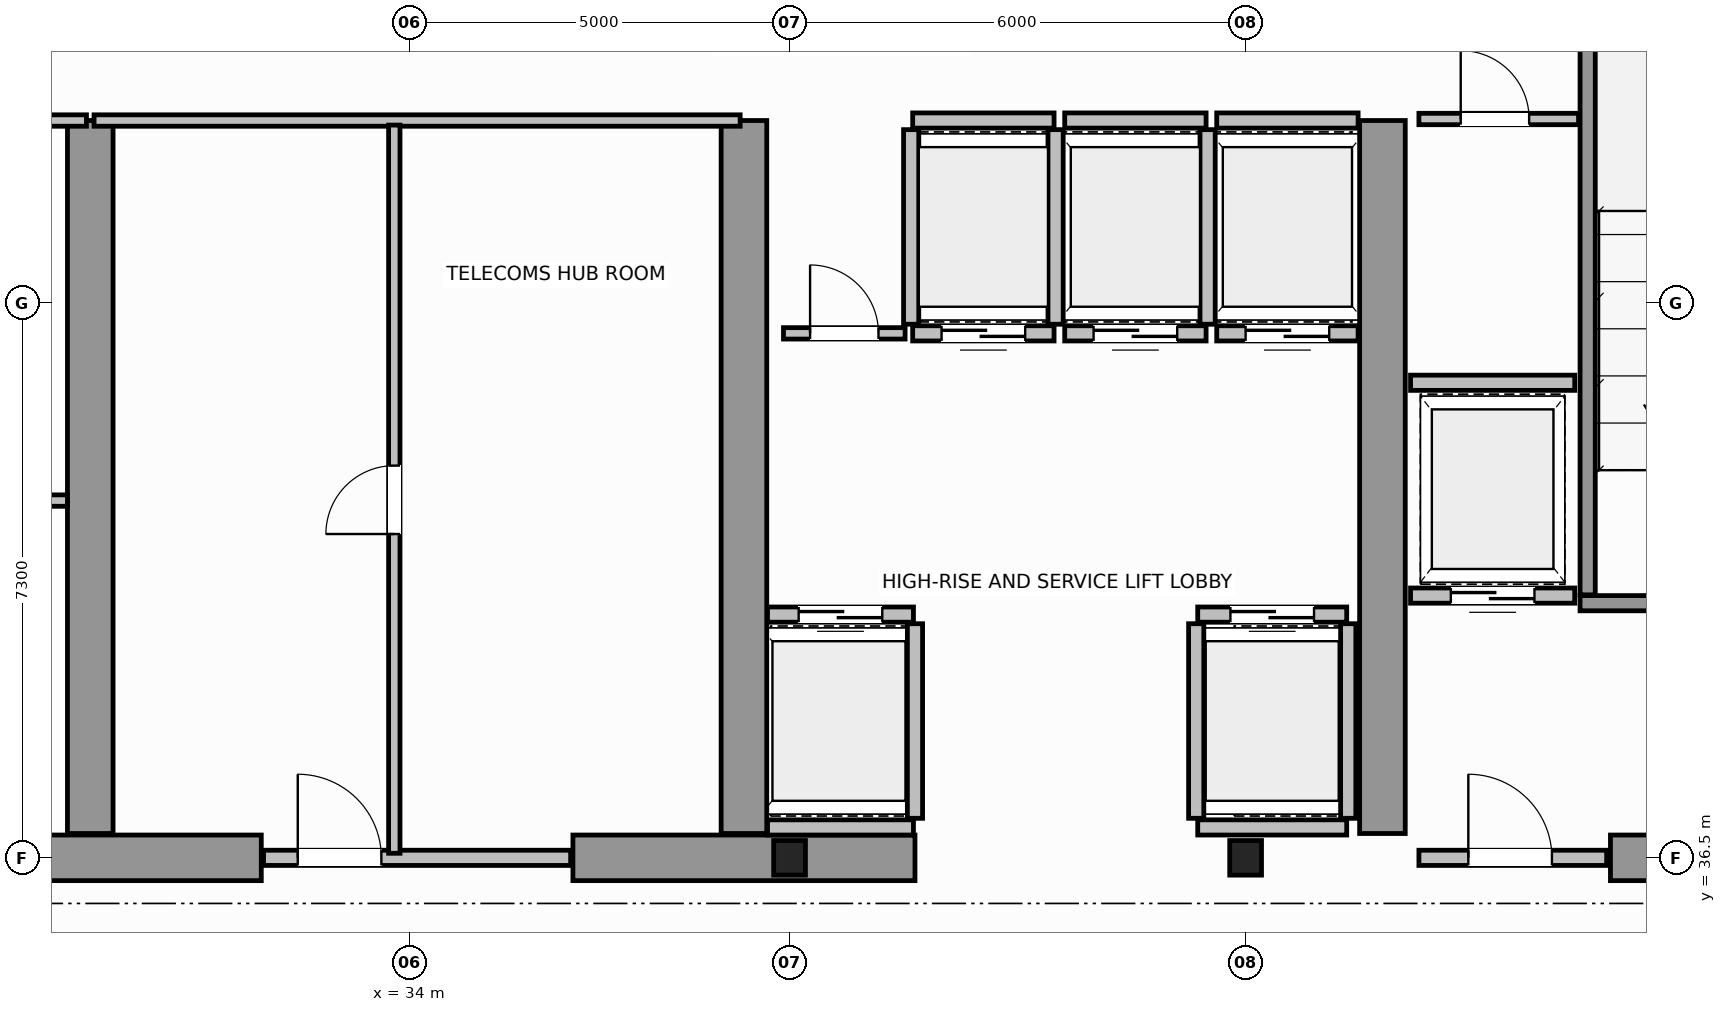
"""IFC4 building model, lengths in metres.
Left out: names, types, materials, properties, quantities, classifications, styles, units other than length and angle.
Written with IfcOpenShell. Run it as: python <this file> out.ifc"""

import sys

from ifc_helpers import new_model, si_unit, direction, frame, frame_2d, origin, origin_2d, place, context, subcontext, project, spatial, rectangle, i_section, extrude, source, transform, mapped, element, fill, save


model = new_model("IFC4")
c1 = context("Model", 3, precision=1e-05, world=origin(), true_north=direction((0.0, 1.0)))
c2 = subcontext(c1, "Body", "Model", "MODEL_VIEW")
j1 = project(units=[si_unit("LENGTHUNIT", "METRE"), si_unit("PLANEANGLEUNIT", "RADIAN")], contexts=[c1])
p1 = place(None, origin())
s1 = spatial("IfcSite", under=j1, at=p1, CompositionType="ELEMENT")
p2 = place(p1, origin())
s2 = spatial("IfcBuilding", under=s1, at=p2, CompositionType="ELEMENT")
p3 = place(p2, frame((0.0, 0.0, 242.2)))
s3 = spatial("IfcBuildingStorey", under=s2, at=p3, CompositionType="ELEMENT", Elevation=242.2)
m1 = source(origin(), c2, "Body", "SweptSolid", [
    extrude(i_section(OverallWidth=0.418, OverallDepth=0.455, WebThickness=0.042, FlangeThickness=0.058, FilletRadius=0.015, at=origin_2d()), origin(), (0.0, 0.0, 1.0), 3.8),
])
for number, where, z_axis, x_axis in (
    (1, (39.0, 36.5, 0.0), (0.0, 0.0, 1.0), (1.0, 0.0, 0.0)),
    (2, (45.0, 36.5, 0.0), (0.0, 0.0, 1.0), (1.0, 0.0, 0.0)),
):
    element("IfcColumn", number, at=place(p3, frame(where, z_axis=z_axis, x_axis=x_axis)), inside=s3, PredefinedType="COLUMN", context=c2, shape_type="MappedRepresentation", body=[
        mapped(m1, transform((0.0, 0.0, 0.0), scale=1.0)),
    ])
for number, where, z_axis, x_axis in (
    (3, (27.55, 36.5, 0.0), (0.0, 0.0, 1.0), (1.0, 0.0, 0.0)),
    (4, (36.15, 36.5, 0.0), (0.0, 0.0, 1.0), (1.0, 0.0, 0.0)),
):
    element("IfcWall", number, at=place(p3, frame(where, z_axis=z_axis, x_axis=x_axis)), inside=s3, PredefinedType="SHEAR", context=c2, shape_type="SweptSolid", body=[
        extrude(rectangle(XDim=4.5, YDim=0.6, at=frame_2d((2.25, 0.0))), origin(), (0.0, 0.0, 1.0), 3.8),
    ])
p4 = place(p3, frame((49.8, 36.5, 0.0), z_axis=(0.0, 0.0, 1.0), x_axis=(1.0, 0.0, 0.0)))
e5 = element("IfcWall", 5, at=p4, inside=s3, PredefinedType="SHEAR", context=c2, shape_type="SweptSolid", body=[
    extrude(rectangle(XDim=3.88, YDim=0.6, at=frame_2d((1.94, 0.0))), origin(), (0.0, 0.0, 1.0), 2.58),
])
for number, where, z_axis, x_axis in (
    (6, (29.8, 36.82, 0.0), (0.0, 0.0, 1.0), (0.0, 1.0, 0.0)),
    (7, (38.4, 36.82, 0.0), (0.0, 0.0, 1.0), (0.0, 1.0, 0.0)),
    (8, (46.8, 36.82, 0.0), (0.0, 0.0, 1.0), (0.0, 1.0, 0.0)),
):
    element("IfcWall", number, at=place(p3, frame(where, z_axis=z_axis, x_axis=x_axis)), inside=s3, PredefinedType="SHEAR", context=c2, shape_type="SweptSolid", body=[
        extrude(rectangle(XDim=9.38, YDim=0.6, at=frame_2d((4.69, 0.0))), origin(), (0.0, 0.0, 1.0), 3.8),
    ])
p5 = place(p3, frame((49.4, 39.85, 0.0), z_axis=(0.0, 0.0, 1.0), x_axis=(1.0, 0.0, 0.0)))
e9 = element("IfcWall", 9, at=p5, inside=s3, PredefinedType="SOLIDWALL", context=c2, shape_type="SweptSolid", body=[
    extrude(rectangle(XDim=4.3, YDim=0.2, at=frame_2d((2.15, 0.0))), origin(), (0.0, 0.0, 1.0), 3.8),
])
p6 = place(p5, frame((1.325, 0.0, 0.0)))
e10 = element("IfcOpeningElement", 10, at=p6, cuts=e9, PredefinedType="OPENING", context=c2, shape_type="SweptSolid", body=[
    extrude(rectangle(XDim=1.1, YDim=2.15, at=frame_2d((0.55, 1.075))), frame((0.0, 0.11, 0.0), z_axis=(0.0, -1.0, 0.0), x_axis=(1.0, 0.0, 0.0)), (0.0, 0.0, 1.0), 0.22),
])
p7 = place(p3, frame((49.5, 39.96, 0.0), z_axis=(0.0, 0.0, 1.0), x_axis=(0.0, 1.0, 0.0)))
e11 = element("IfcWall", 11, at=p7, inside=s3, PredefinedType="SOLIDWALL", context=c2, shape_type="SweptSolid", body=[
    extrude(rectangle(XDim=9.93, YDim=0.2, at=frame_2d((4.965, 0.0))), origin(), (0.0, 0.0, 1.0), 3.8),
])
p8 = place(p3, frame((47.28, 36.5, 0.0), z_axis=(0.0, 0.0, 1.0), x_axis=(1.0, 0.0, 0.0)))
e12 = element("IfcWall", 12, at=p8, inside=s3, PredefinedType="SOLIDWALL", context=c2, shape_type="SweptSolid", body=[
    extrude(rectangle(XDim=2.47, YDim=0.2, at=frame_2d((1.235, 0.0))), origin(), (0.0, 0.0, 1.0), 2.57),
])
p9 = place(p8, frame((0.65, 0.0, 0.0)))
e13 = element("IfcOpeningElement", 13, at=p9, cuts=e12, PredefinedType="OPENING", context=c2, shape_type="SweptSolid", body=[
    extrude(rectangle(XDim=1.1, YDim=2.15, at=frame_2d((0.55, 1.075))), frame((0.0, 0.11, 0.0), z_axis=(0.0, -1.0, 0.0), x_axis=(1.0, 0.0, 0.0)), (0.0, 0.0, 1.0), 0.22),
])
p10 = place(p3, frame((38.71, 39.7, 0.0), z_axis=(0.0, 0.0, 1.0), x_axis=(1.0, 0.0, 0.0)))
e14 = element("IfcWall", 14, at=p10, inside=s3, PredefinedType="SOLIDWALL", context=c2, shape_type="SweptSolid", body=[
    extrude(rectangle(XDim=1.92, YDim=0.2, at=frame_2d((0.96, 0.0))), origin(), (0.0, 0.0, 1.0), 3.58),
])
p11 = place(p10, frame((0.41, 0.0, 0.0)))
e15 = element("IfcOpeningElement", 15, at=p11, cuts=e14, PredefinedType="OPENING", context=c2, shape_type="SweptSolid", body=[
    extrude(rectangle(XDim=1.1, YDim=2.15, at=frame_2d((0.55, 1.075))), frame((0.0, 0.11, 0.0), z_axis=(0.0, -1.0, 0.0), x_axis=(1.0, 0.0, 0.0)), (0.0, 0.0, 1.0), 0.22),
])
p12 = place(p3, frame((38.71, 36.9, 0.0), z_axis=(0.0, 0.0, 1.0), x_axis=(1.0, 0.0, 0.0)))
e16 = element("IfcWall", 16, at=p12, inside=s3, PredefinedType="SOLIDWALL", context=c2, shape_type="SweptSolid", body=[
    extrude(rectangle(XDim=1.92, YDim=0.2, at=frame_2d((0.96, 0.0))), origin(), (0.0, 0.0, 1.0), 3.58),
])
p13 = place(p3, frame((40.65, 37.02, 0.0), z_axis=(0.0, 0.0, 1.0), x_axis=(0.0, 1.0, 0.0)))
e17 = element("IfcWall", 17, at=p13, inside=s3, PredefinedType="SOLIDWALL", context=c2, shape_type="SweptSolid", body=[
    extrude(rectangle(XDim=2.56, YDim=0.2, at=frame_2d((1.28, 0.0))), origin(), (0.0, 0.0, 1.0), 3.58),
])
p14 = place(p3, frame((44.37, 39.7, 0.0), z_axis=(0.0, 0.0, 1.0), x_axis=(1.0, 0.0, 0.0)))
e18 = element("IfcWall", 18, at=p14, inside=s3, PredefinedType="SOLIDWALL", context=c2, shape_type="SweptSolid", body=[
    extrude(rectangle(XDim=1.96, YDim=0.2, at=frame_2d((0.98, 0.0))), origin(), (0.0, 0.0, 1.0), 3.58),
])
p15 = place(p14, frame((0.43, 0.0, 0.0)))
e19 = element("IfcOpeningElement", 19, at=p15, cuts=e18, PredefinedType="OPENING", context=c2, shape_type="SweptSolid", body=[
    extrude(rectangle(XDim=1.1, YDim=2.15, at=frame_2d((0.55, 1.075))), frame((0.0, 0.11, 0.0), z_axis=(0.0, -1.0, 0.0), x_axis=(1.0, 0.0, 0.0)), (0.0, 0.0, 1.0), 0.22),
])
p16 = place(p3, frame((44.37, 36.9, 0.0), z_axis=(0.0, 0.0, 1.0), x_axis=(1.0, 0.0, 0.0)))
e20 = element("IfcWall", 20, at=p16, inside=s3, PredefinedType="SOLIDWALL", context=c2, shape_type="SweptSolid", body=[
    extrude(rectangle(XDim=1.96, YDim=0.2, at=frame_2d((0.98, 0.0))), origin(), (0.0, 0.0, 1.0), 2.57),
])
for number, where, z_axis, x_axis in (
    (21, (44.35, 37.02, 0.0), (0.0, 0.0, 1.0), (0.0, 1.0, 0.0)),
    (22, (46.35, 37.02, 0.0), (0.0, 0.0, 1.0), (0.0, 1.0, 0.0)),
):
    element("IfcWall", number, at=place(p3, frame(where, z_axis=z_axis, x_axis=x_axis)), inside=s3, PredefinedType="SOLIDWALL", context=c2, shape_type="SweptSolid", body=[
        extrude(rectangle(XDim=2.56, YDim=0.2, at=frame_2d((1.28, 0.0))), origin(), (0.0, 0.0, 1.0), 3.58),
    ])
p17 = place(p3, frame((40.62, 43.4, 0.0), z_axis=(0.0, 0.0, 1.0), x_axis=(1.0, 0.0, 0.0)))
e23 = element("IfcWall", 23, at=p17, inside=s3, PredefinedType="SOLIDWALL", context=c2, shape_type="SweptSolid", body=[
    extrude(rectangle(XDim=1.86, YDim=0.2, at=frame_2d((0.93, 0.0))), origin(), (0.0, 0.0, 1.0), 3.58),
])
p18 = place(p17, frame((0.38, 0.0, 0.0)))
e24 = element("IfcOpeningElement", 24, at=p18, cuts=e23, PredefinedType="OPENING", context=c2, shape_type="SweptSolid", body=[
    extrude(rectangle(XDim=1.1, YDim=2.15, at=frame_2d((0.55, 1.075))), frame((0.0, 0.11, 0.0), z_axis=(0.0, -1.0, 0.0), x_axis=(1.0, 0.0, 0.0)), (0.0, 0.0, 1.0), 0.22),
])
p19 = place(p3, frame((40.62, 46.2, 0.0), z_axis=(0.0, 0.0, 1.0), x_axis=(1.0, 0.0, 0.0)))
e25 = element("IfcWall", 25, at=p19, inside=s3, PredefinedType="SOLIDWALL", context=c2, shape_type="SweptSolid", body=[
    extrude(rectangle(XDim=1.86, YDim=0.2, at=frame_2d((0.93, 0.0))), origin(), (0.0, 0.0, 1.0), 3.58),
])
for number, where, z_axis, x_axis in (
    (26, (40.6, 43.52, 0.0), (0.0, 0.0, 1.0), (0.0, 1.0, 0.0)),
    (27, (42.5, 43.52, 0.0), (0.0, 0.0, 1.0), (0.0, 1.0, 0.0)),
):
    element("IfcWall", number, at=place(p3, frame(where, z_axis=z_axis, x_axis=x_axis)), inside=s3, PredefinedType="SOLIDWALL", context=c2, shape_type="SweptSolid", body=[
        extrude(rectangle(XDim=2.56, YDim=0.2, at=frame_2d((1.28, 0.0))), origin(), (0.0, 0.0, 1.0), 3.58),
    ])
p20 = place(p3, frame((42.62, 43.4, 0.0), z_axis=(0.0, 0.0, 1.0), x_axis=(1.0, 0.0, 0.0)))
e28 = element("IfcWall", 28, at=p20, inside=s3, PredefinedType="SOLIDWALL", context=c2, shape_type="SweptSolid", body=[
    extrude(rectangle(XDim=1.86, YDim=0.2, at=frame_2d((0.93, 0.0))), origin(), (0.0, 0.0, 1.0), 3.58),
])
p21 = place(p20, frame((0.38, 0.0, 0.0)))
e29 = element("IfcOpeningElement", 29, at=p21, cuts=e28, PredefinedType="OPENING", context=c2, shape_type="SweptSolid", body=[
    extrude(rectangle(XDim=1.1, YDim=2.15, at=frame_2d((0.55, 1.075))), frame((0.0, 0.11, 0.0), z_axis=(0.0, -1.0, 0.0), x_axis=(1.0, 0.0, 0.0)), (0.0, 0.0, 1.0), 0.22),
])
p22 = place(p3, frame((42.62, 46.2, 0.0), z_axis=(0.0, 0.0, 1.0), x_axis=(1.0, 0.0, 0.0)))
e30 = element("IfcWall", 30, at=p22, inside=s3, PredefinedType="SOLIDWALL", context=c2, shape_type="SweptSolid", body=[
    extrude(rectangle(XDim=1.86, YDim=0.2, at=frame_2d((0.93, 0.0))), origin(), (0.0, 0.0, 1.0), 3.58),
])
p23 = place(p3, frame((44.5, 43.52, 0.0), z_axis=(0.0, 0.0, 1.0), x_axis=(0.0, 1.0, 0.0)))
e31 = element("IfcWall", 31, at=p23, inside=s3, PredefinedType="SOLIDWALL", context=c2, shape_type="SweptSolid", body=[
    extrude(rectangle(XDim=2.56, YDim=0.2, at=frame_2d((1.28, 0.0))), origin(), (0.0, 0.0, 1.0), 3.58),
])
p24 = place(p3, frame((44.62, 43.4, 0.0), z_axis=(0.0, 0.0, 1.0), x_axis=(1.0, 0.0, 0.0)))
e32 = element("IfcWall", 32, at=p24, inside=s3, PredefinedType="SOLIDWALL", context=c2, shape_type="SweptSolid", body=[
    extrude(rectangle(XDim=1.86, YDim=0.2, at=frame_2d((0.93, 0.0))), origin(), (0.0, 0.0, 1.0), 3.58),
])
p25 = place(p24, frame((0.38, 0.0, 0.0)))
e33 = element("IfcOpeningElement", 33, at=p25, cuts=e32, PredefinedType="OPENING", context=c2, shape_type="SweptSolid", body=[
    extrude(rectangle(XDim=1.1, YDim=2.15, at=frame_2d((0.55, 1.075))), frame((0.0, 0.11, 0.0), z_axis=(0.0, -1.0, 0.0), x_axis=(1.0, 0.0, 0.0)), (0.0, 0.0, 1.0), 0.22),
])
p26 = place(p3, frame((44.62, 46.2, 0.0), z_axis=(0.0, 0.0, 1.0), x_axis=(1.0, 0.0, 0.0)))
e34 = element("IfcWall", 34, at=p26, inside=s3, PredefinedType="SOLIDWALL", context=c2, shape_type="SweptSolid", body=[
    extrude(rectangle(XDim=1.86, YDim=0.2, at=frame_2d((0.93, 0.0))), origin(), (0.0, 0.0, 1.0), 3.58),
])
p27 = place(p3, frame((47.17, 39.95, 0.0), z_axis=(0.0, 0.0, 1.0), x_axis=(1.0, 0.0, 0.0)))
e35 = element("IfcWall", 35, at=p27, inside=s3, PredefinedType="SOLIDWALL", context=c2, shape_type="SweptSolid", body=[
    extrude(rectangle(XDim=2.16, YDim=0.2, at=frame_2d((1.08, 0.0))), origin(), (0.0, 0.0, 1.0), 3.58),
])
p28 = place(p27, frame((0.53, 0.0, 0.0)))
e36 = element("IfcOpeningElement", 36, at=p28, cuts=e35, PredefinedType="OPENING", context=c2, shape_type="SweptSolid", body=[
    extrude(rectangle(XDim=1.1, YDim=2.15, at=frame_2d((0.55, 1.075))), frame((0.0, 0.11, 0.0), z_axis=(0.0, -1.0, 0.0), x_axis=(1.0, 0.0, 0.0)), (0.0, 0.0, 1.0), 0.22),
])
p29 = place(p3, frame((47.17, 42.75, 0.0), z_axis=(0.0, 0.0, 1.0), x_axis=(1.0, 0.0, 0.0)))
e37 = element("IfcWall", 37, at=p29, inside=s3, PredefinedType="SOLIDWALL", context=c2, shape_type="SweptSolid", body=[
    extrude(rectangle(XDim=2.16, YDim=0.2, at=frame_2d((1.08, 0.0))), origin(), (0.0, 0.0, 1.0), 3.58),
])
p30 = place(p3, frame((21.25, 46.2, 0.0), z_axis=(0.0, 0.0, 1.0), x_axis=(1.0, 0.0, 0.0)))
e38 = element("IfcWall", 38, at=p30, inside=s3, PredefinedType="PARTITIONING", context=c2, shape_type="SweptSolid", body=[
    extrude(rectangle(XDim=8.5, YDim=0.15, at=frame_2d((4.25, 0.0))), origin(), (0.0, 0.0, 1.0), 3.58),
])
p31 = place(p3, frame((21.5, 41.2, 0.0), z_axis=(0.0, 0.0, 1.0), x_axis=(1.0, 0.0, 0.0)))
e39 = element("IfcWall", 39, at=p31, inside=s3, PredefinedType="PARTITIONING", context=c2, shape_type="SweptSolid", body=[
    extrude(rectangle(XDim=8.0, YDim=0.15, at=frame_2d((4.0, 0.0))), origin(), (0.0, 0.0, 1.0), 3.58),
])
p32 = place(p31, frame((3.4, 0.0, 0.0)))
e40 = element("IfcOpeningElement", 40, at=p32, cuts=e39, PredefinedType="OPENING", context=c2, shape_type="SweptSolid", body=[
    extrude(rectangle(XDim=0.9, YDim=2.1, at=frame_2d((0.45, 1.05))), frame((0.0, 0.085, 0.0), z_axis=(0.0, -1.0, 0.0), x_axis=(1.0, 0.0, 0.0)), (0.0, 0.0, 1.0), 0.17),
])
p33 = place(p3, frame((32.08, 36.5, 0.0), z_axis=(0.0, 0.0, 1.0), x_axis=(1.0, 0.0, 0.0)))
e41 = element("IfcWall", 41, at=p33, inside=s3, PredefinedType="SOLIDWALL", context=c2, shape_type="SweptSolid", body=[
    extrude(rectangle(XDim=4.04, YDim=0.2, at=frame_2d((2.02, 0.0))), origin(), (0.0, 0.0, 1.0), 3.02),
])
p34 = place(p33, frame((0.45, 0.0, 0.0)))
e42 = element("IfcOpeningElement", 42, at=p34, cuts=e41, PredefinedType="OPENING", context=c2, shape_type="SweptSolid", body=[
    extrude(rectangle(XDim=1.1, YDim=2.15, at=frame_2d((0.55, 1.075))), frame((0.0, 0.11, 0.0), z_axis=(0.0, -1.0, 0.0), x_axis=(1.0, 0.0, 0.0)), (0.0, 0.0, 1.0), 0.22),
])
p35 = place(p3, frame((29.85, 46.2, 0.0), z_axis=(0.0, 0.0, 1.0), x_axis=(1.0, 0.0, 0.0)))
e43 = element("IfcWall", 43, at=p35, inside=s3, PredefinedType="PARTITIONING", context=c2, shape_type="SweptSolid", body=[
    extrude(rectangle(XDim=8.5, YDim=0.15, at=frame_2d((4.25, 0.0))), origin(), (0.0, 0.0, 1.0), 3.58),
])
p36 = place(p3, frame((33.8, 36.56, 0.0), z_axis=(0.0, 0.0, 1.0), x_axis=(0.0, 1.0, 0.0)))
e44 = element("IfcWall", 44, at=p36, inside=s3, PredefinedType="PARTITIONING", context=c2, shape_type="SweptSolid", body=[
    extrude(rectangle(XDim=9.58, YDim=0.15, at=frame_2d((4.79, 0.0))), origin(), (0.0, 0.0, 1.0), 3.58),
])
p37 = place(p36, frame((4.2, 0.0, 0.0)))
e45 = element("IfcOpeningElement", 45, at=p37, cuts=e44, PredefinedType="OPENING", context=c2, shape_type="SweptSolid", body=[
    extrude(rectangle(XDim=0.9, YDim=2.1, at=frame_2d((0.45, 1.05))), frame((0.0, 0.085, 0.0), z_axis=(0.0, -1.0, 0.0), x_axis=(1.0, 0.0, 0.0)), (0.0, 0.0, 1.0), 0.17),
])
p38 = place(p3, frame((47.28, 46.22, 0.0), z_axis=(0.0, 0.0, 1.0), x_axis=(1.0, 0.0, 0.0)))
e46 = element("IfcWall", 46, at=p38, inside=s3, PredefinedType="PARTITIONING", context=c2, shape_type="SweptSolid", body=[
    extrude(rectangle(XDim=2.1, YDim=0.15, at=frame_2d((1.05, 0.0))), origin(), (0.0, 0.0, 1.0), 3.58),
])
p39 = place(p38, frame((0.55, 0.0, 0.0)))
e47 = element("IfcOpeningElement", 47, at=p39, cuts=e46, PredefinedType="OPENING", context=c2, shape_type="SweptSolid", body=[
    extrude(rectangle(XDim=0.9, YDim=2.1, at=frame_2d((0.45, 1.05))), frame((0.0, 0.085, 0.0), z_axis=(0.0, -1.0, 0.0), x_axis=(1.0, 0.0, 0.0)), (0.0, 0.0, 1.0), 0.17),
])
p40 = place(p3, frame((38.92, 43.4, 0.0), z_axis=(0.0, 0.0, 1.0), x_axis=(1.0, 0.0, 0.0)))
e48 = element("IfcWall", 48, at=p40, inside=s3, PredefinedType="PARTITIONING", context=c2, shape_type="SweptSolid", body=[
    extrude(rectangle(XDim=1.6, YDim=0.15, at=frame_2d((0.8, 0.0))), origin(), (0.0, 0.0, 1.0), 3.58),
])
p41 = place(p40, frame((0.35, 0.0, 0.0)))
e49 = element("IfcOpeningElement", 49, at=p41, cuts=e48, PredefinedType="OPENING", context=c2, shape_type="SweptSolid", body=[
    extrude(rectangle(XDim=0.9, YDim=2.1, at=frame_2d((0.45, 1.05))), frame((0.0, 0.085, 0.0), z_axis=(0.0, -1.0, 0.0), x_axis=(1.0, 0.0, 0.0)), (0.0, 0.0, 1.0), 0.17),
])
m2 = source(origin(), c2, "Body", "SweptSolid", [
    extrude(rectangle(XDim=1.1, YDim=2.15, at=frame_2d((0.55, 1.075))), frame((0.0, 0.025, 0.0), z_axis=(0.0, -1.0, 0.0), x_axis=(1.0, 0.0, 0.0)), (0.0, 0.0, 1.0), 0.05),
])
p42 = place(p9, origin())
e50 = element("IfcDoor", 50, at=p42, inside=s3, OperationType="SINGLE_SWING_LEFT", PredefinedType="DOOR", context=c2, shape_type="MappedRepresentation", body=[
    mapped(m2, transform((0.0, 0.0, 0.0), scale=1.0)),
])
fill(e13, e50)
p43 = place(p11, origin())
e51 = element("IfcDoor", 51, at=p43, inside=s3, OperationType="DOUBLE_DOOR_SLIDING", PredefinedType="DOOR", context=c2, shape_type="MappedRepresentation", body=[
    mapped(m2, transform((0.0, 0.0, 0.0), scale=1.0)),
])
fill(e15, e51)
p44 = place(p15, origin())
e52 = element("IfcDoor", 52, at=p44, inside=s3, OperationType="DOUBLE_DOOR_SLIDING", PredefinedType="DOOR", context=c2, shape_type="MappedRepresentation", body=[
    mapped(m2, transform((0.0, 0.0, 0.0), scale=1.0)),
])
fill(e19, e52)
p45 = place(p18, origin())
e53 = element("IfcDoor", 53, at=p45, inside=s3, OperationType="DOUBLE_DOOR_SLIDING", PredefinedType="DOOR", context=c2, shape_type="MappedRepresentation", body=[
    mapped(m2, transform((0.0, 0.0, 0.0), scale=1.0)),
])
fill(e24, e53)
p46 = place(p21, origin())
e54 = element("IfcDoor", 54, at=p46, inside=s3, OperationType="DOUBLE_DOOR_SLIDING", PredefinedType="DOOR", context=c2, shape_type="MappedRepresentation", body=[
    mapped(m2, transform((0.0, 0.0, 0.0), scale=1.0)),
])
fill(e29, e54)
p47 = place(p25, origin())
e55 = element("IfcDoor", 55, at=p47, inside=s3, OperationType="DOUBLE_DOOR_SLIDING", PredefinedType="DOOR", context=c2, shape_type="MappedRepresentation", body=[
    mapped(m2, transform((0.0, 0.0, 0.0), scale=1.0)),
])
fill(e33, e55)
p48 = place(p28, origin())
e56 = element("IfcDoor", 56, at=p48, inside=s3, OperationType="DOUBLE_DOOR_SLIDING", PredefinedType="DOOR", context=c2, shape_type="MappedRepresentation", body=[
    mapped(m2, transform((0.0, 0.0, 0.0), scale=1.0)),
])
fill(e36, e56)
p49 = place(p34, origin())
e57 = element("IfcDoor", 57, at=p49, inside=s3, OperationType="SINGLE_SWING_LEFT", PredefinedType="DOOR", context=c2, shape_type="MappedRepresentation", body=[
    mapped(m2, transform((0.0, 0.0, 0.0), scale=1.0)),
])
fill(e42, e57)
m3 = source(origin(), c2, "Body", "SweptSolid", [
    extrude(rectangle(XDim=0.9, YDim=2.1, at=frame_2d((0.45, 1.05))), frame((0.0, 0.025, 0.0), z_axis=(0.0, -1.0, 0.0), x_axis=(1.0, 0.0, 0.0)), (0.0, 0.0, 1.0), 0.05),
])
p50 = place(p37, origin())
e58 = element("IfcDoor", 58, at=p50, inside=s3, OperationType="SINGLE_SWING_RIGHT", PredefinedType="DOOR", context=c2, shape_type="MappedRepresentation", body=[
    mapped(m3, transform((0.0, 0.0, 0.0), scale=1.0)),
])
fill(e45, e58)
p51 = place(p39, origin())
e59 = element("IfcDoor", 59, at=p51, inside=s3, OperationType="SINGLE_SWING_RIGHT", PredefinedType="DOOR", context=c2, shape_type="MappedRepresentation", body=[
    mapped(m3, transform((0.0, 0.0, 0.0), scale=1.0)),
])
fill(e47, e59)
p52 = place(p41, origin())
e60 = element("IfcDoor", 60, at=p52, inside=s3, OperationType="SINGLE_SWING_LEFT", PredefinedType="DOOR", context=c2, shape_type="MappedRepresentation", body=[
    mapped(m3, transform((0.0, 0.0, 0.0), scale=1.0)),
])
fill(e49, e60)
save(model, sys.argv[1])
